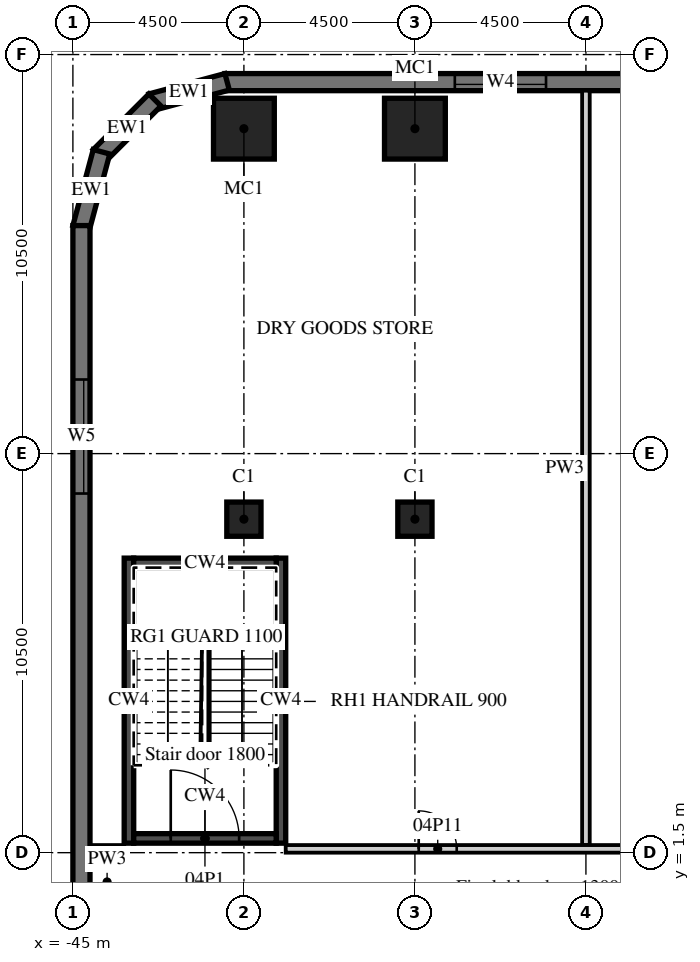
"""IFC4 building model, lengths in metres.
Left out: names, types, materials, properties, quantities, classifications, styles, units other than length and angle.
Written with IfcOpenShell. Run it as: python <this file> out.ifc"""

import sys

from ifc_helpers import new_model, si_unit, direction, frame, frame_2d, origin, origin_2d, place, context, subcontext, project, spatial, polyline, rectangle, outline, extrude, element, fill, save


model = new_model("IFC4")
c1 = context("Model", 3, precision=1e-05, world=origin(), true_north=direction((0.0, 1.0)))
c2 = subcontext(c1, "Body", "Model", "MODEL_VIEW")
j1 = project(units=[si_unit("LENGTHUNIT", "METRE"), si_unit("PLANEANGLEUNIT", "RADIAN")], contexts=[c1])
p1 = place(None, origin())
s1 = spatial("IfcSite", under=j1, at=p1, CompositionType="ELEMENT")
p2 = place(p1, origin())
s2 = spatial("IfcBuilding", under=s1, at=p2, CompositionType="ELEMENT")
p3 = place(p2, frame((0.0, 0.0, 29.0)))
s3 = spatial("IfcBuildingStorey", under=s2, at=p3, CompositionType="ELEMENT", Elevation=29.0)
for number, where, z_axis, x_axis in (
    (1, (-40.5, 20.55, 0.0), (0.0, 0.0, 1.0), (1.0, 0.0, 0.0)),
    (2, (-36.0, 20.55, 0.0), (0.0, 0.0, 1.0), (1.0, 0.0, 0.0)),
):
    element("IfcColumn", number, at=place(p3, frame(where, z_axis=z_axis, x_axis=x_axis)), inside=s3, PredefinedType="COLUMN", context=c2, shape_type="SweptSolid", body=[
        extrude(rectangle(XDim=1.6, YDim=1.6, at=origin_2d()), origin(), (0.0, 0.0, 1.0), 4.5),
    ])
for number, where, z_axis, x_axis in (
    (3, (-40.5, 10.275, 0.0), (0.0, 0.0, 1.0), (1.0, 0.0, 0.0)),
    (4, (-36.0, 10.275, 0.0), (0.0, 0.0, 1.0), (1.0, 0.0, 0.0)),
):
    element("IfcColumn", number, at=place(p3, frame(where, z_axis=z_axis, x_axis=x_axis)), inside=s3, PredefinedType="COLUMN", context=c2, shape_type="SweptSolid", body=[
        extrude(rectangle(XDim=0.9, YDim=0.9, at=origin_2d()), origin(), (0.0, 0.0, 1.0), 4.5),
    ])
p4 = place(p3, frame((13.5, 21.775, 0.0), z_axis=(0.0, 0.0, 1.0), x_axis=(-1.0, 0.0, 0.0)))
e5 = element("IfcWall", 5, at=p4, inside=s3, PredefinedType="SOLIDWALL", context=c2, shape_type="SweptSolid", body=[
    extrude(rectangle(XDim=54.5, YDim=0.45, at=frame_2d((27.25, 0.0))), origin(), (0.0, 0.0, 1.0), 4.05),
])
p5 = place(p4, frame((1.05, 0.0, 0.9)))
e6 = element("IfcOpeningElement", 6, at=p5, cuts=e5, PredefinedType="OPENING", context=c2, shape_type="SweptSolid", body=[
    extrude(rectangle(XDim=2.4, YDim=1.8, at=frame_2d((1.2, 0.9))), frame((0.0, 0.235, 0.0), z_axis=(0.0, -1.0, 0.0), x_axis=(1.0, 0.0, 0.0)), (0.0, 0.0, 1.0), 0.47),
])
p6 = place(p4, frame((5.55, 0.0, 0.9)))
e7 = element("IfcOpeningElement", 7, at=p6, cuts=e5, PredefinedType="OPENING", context=c2, shape_type="SweptSolid", body=[
    extrude(rectangle(XDim=2.4, YDim=1.8, at=frame_2d((1.2, 0.9))), frame((0.0, 0.235, 0.0), z_axis=(0.0, -1.0, 0.0), x_axis=(1.0, 0.0, 0.0)), (0.0, 0.0, 1.0), 0.47),
])
p7 = place(p4, frame((10.05, 0.0, 0.9)))
e8 = element("IfcOpeningElement", 8, at=p7, cuts=e5, PredefinedType="OPENING", context=c2, shape_type="SweptSolid", body=[
    extrude(rectangle(XDim=2.4, YDim=1.8, at=frame_2d((1.2, 0.9))), frame((0.0, 0.235, 0.0), z_axis=(0.0, -1.0, 0.0), x_axis=(1.0, 0.0, 0.0)), (0.0, 0.0, 1.0), 0.47),
])
p8 = place(p4, frame((14.55, 0.0, 0.9)))
e9 = element("IfcOpeningElement", 9, at=p8, cuts=e5, PredefinedType="OPENING", context=c2, shape_type="SweptSolid", body=[
    extrude(rectangle(XDim=2.4, YDim=1.8, at=frame_2d((1.2, 0.9))), frame((0.0, 0.235, 0.0), z_axis=(0.0, -1.0, 0.0), x_axis=(1.0, 0.0, 0.0)), (0.0, 0.0, 1.0), 0.47),
])
p9 = place(p4, frame((19.05, 0.0, 0.9)))
e10 = element("IfcOpeningElement", 10, at=p9, cuts=e5, PredefinedType="OPENING", context=c2, shape_type="SweptSolid", body=[
    extrude(rectangle(XDim=2.4, YDim=1.8, at=frame_2d((1.2, 0.9))), frame((0.0, 0.235, 0.0), z_axis=(0.0, -1.0, 0.0), x_axis=(1.0, 0.0, 0.0)), (0.0, 0.0, 1.0), 0.47),
])
p10 = place(p4, frame((23.55, 0.0, 0.9)))
e11 = element("IfcOpeningElement", 11, at=p10, cuts=e5, PredefinedType="OPENING", context=c2, shape_type="SweptSolid", body=[
    extrude(rectangle(XDim=2.4, YDim=1.8, at=frame_2d((1.2, 0.9))), frame((0.0, 0.235, 0.0), z_axis=(0.0, -1.0, 0.0), x_axis=(1.0, 0.0, 0.0)), (0.0, 0.0, 1.0), 0.47),
])
p11 = place(p4, frame((28.05, 0.0, 0.9)))
e12 = element("IfcOpeningElement", 12, at=p11, cuts=e5, PredefinedType="OPENING", context=c2, shape_type="SweptSolid", body=[
    extrude(rectangle(XDim=2.4, YDim=1.8, at=frame_2d((1.2, 0.9))), frame((0.0, 0.235, 0.0), z_axis=(0.0, -1.0, 0.0), x_axis=(1.0, 0.0, 0.0)), (0.0, 0.0, 1.0), 0.47),
])
p12 = place(p4, frame((32.55, 0.0, 0.9)))
e13 = element("IfcOpeningElement", 13, at=p12, cuts=e5, PredefinedType="OPENING", context=c2, shape_type="SweptSolid", body=[
    extrude(rectangle(XDim=2.4, YDim=1.8, at=frame_2d((1.2, 0.9))), frame((0.0, 0.235, 0.0), z_axis=(0.0, -1.0, 0.0), x_axis=(1.0, 0.0, 0.0)), (0.0, 0.0, 1.0), 0.47),
])
p13 = place(p4, frame((37.05, 0.0, 0.9)))
e14 = element("IfcOpeningElement", 14, at=p13, cuts=e5, PredefinedType="OPENING", context=c2, shape_type="SweptSolid", body=[
    extrude(rectangle(XDim=2.4, YDim=1.8, at=frame_2d((1.2, 0.9))), frame((0.0, 0.235, 0.0), z_axis=(0.0, -1.0, 0.0), x_axis=(1.0, 0.0, 0.0)), (0.0, 0.0, 1.0), 0.47),
])
p14 = place(p4, frame((41.55, 0.0, 0.9)))
e15 = element("IfcOpeningElement", 15, at=p14, cuts=e5, PredefinedType="OPENING", context=c2, shape_type="SweptSolid", body=[
    extrude(rectangle(XDim=2.4, YDim=1.8, at=frame_2d((1.2, 0.9))), frame((0.0, 0.235, 0.0), z_axis=(0.0, -1.0, 0.0), x_axis=(1.0, 0.0, 0.0)), (0.0, 0.0, 1.0), 0.47),
])
p15 = place(p4, frame((46.05, 0.0, 0.9)))
e16 = element("IfcOpeningElement", 16, at=p15, cuts=e5, PredefinedType="OPENING", context=c2, shape_type="SweptSolid", body=[
    extrude(rectangle(XDim=2.4, YDim=1.8, at=frame_2d((1.2, 0.9))), frame((0.0, 0.235, 0.0), z_axis=(0.0, -1.0, 0.0), x_axis=(1.0, 0.0, 0.0)), (0.0, 0.0, 1.0), 0.47),
])
p16 = place(p3, frame((-40.942, 21.783, 0.0), z_axis=(0.0, 0.0, 1.0), x_axis=(-0.965926999034, -0.25881466832, 0.0)))
e17 = element("IfcWall", 17, at=p16, inside=s3, PredefinedType="SOLIDWALL", context=c2, shape_type="SweptSolid", body=[
    extrude(outline(polyline([(0.0, -0.225), (2.071, -0.225), (1.95, 0.225), (0.121, 0.225), (0.0, -0.225)])), origin(), (0.0, 0.0, 1.0), 4.05),
])
p17 = place(p3, frame((-42.841, 21.305, 0.0), z_axis=(0.0, 0.0, 1.0), x_axis=(-0.707106781187, -0.707106781187, 0.0)))
e18 = element("IfcWall", 18, at=p17, inside=s3, PredefinedType="SOLIDWALL", context=c2, shape_type="SweptSolid", body=[
    extrude(outline(polyline([(0.0, -0.225), (2.071, -0.225), (1.95, 0.225), (0.121, 0.225), (0.0, -0.225)])), origin(), (0.0, 0.0, 1.0), 4.05),
])
p18 = place(p3, frame((-44.247, 19.942, 0.0), z_axis=(0.0, 0.0, 1.0), x_axis=(-0.25881466832, -0.965926999034, 0.0)))
e19 = element("IfcWall", 19, at=p18, inside=s3, PredefinedType="SOLIDWALL", context=c2, shape_type="SweptSolid", body=[
    extrude(outline(polyline([(-0.0, -0.225), (2.07, -0.225), (1.95, 0.225), (0.12, 0.225), (-0.0, -0.225)])), origin(), (0.0, 0.0, 1.0), 4.05),
])
p19 = place(p3, frame((-44.775, 18.0, 0.0), z_axis=(0.0, 0.0, 1.0), x_axis=(0.0, -1.0, 0.0)))
e20 = element("IfcWall", 20, at=p19, inside=s3, PredefinedType="SOLIDWALL", context=c2, shape_type="SweptSolid", body=[
    extrude(rectangle(XDim=36.0, YDim=0.45, at=frame_2d((18.0, 0.0))), origin(), (0.0, 0.0, 1.0), 4.05),
])
p20 = place(p19, frame((4.05, 0.0, 0.9)))
e21 = element("IfcOpeningElement", 21, at=p20, cuts=e20, PredefinedType="OPENING", context=c2, shape_type="SweptSolid", body=[
    extrude(rectangle(XDim=3.0, YDim=1.8, at=frame_2d((1.5, 0.9))), frame((0.0, 0.235, 0.0), z_axis=(0.0, -1.0, 0.0), x_axis=(1.0, 0.0, 0.0)), (0.0, 0.0, 1.0), 0.47),
])
for number, where, z_axis, x_axis in (
    (22, (-43.525, 1.75, 0.0), (0.0, 0.0, 1.0), (0.0, 1.0, 0.0)),
    (23, (-39.525, 1.75, 0.0), (0.0, 0.0, 1.0), (0.0, 1.0, 0.0)),
):
    element("IfcWall", number, at=place(p3, frame(where, z_axis=z_axis, x_axis=x_axis)), inside=s3, PredefinedType="SHEAR", context=c2, shape_type="SweptSolid", body=[
        extrude(rectangle(XDim=7.5, YDim=0.25, at=frame_2d((3.75, 0.0))), origin(), (0.0, 0.0, 1.0), 4.05),
    ])
p21 = place(p3, frame((-43.4, 9.125, 0.0), z_axis=(0.0, 0.0, 1.0), x_axis=(1.0, 0.0, 0.0)))
e24 = element("IfcWall", 24, at=p21, inside=s3, PredefinedType="SHEAR", context=c2, shape_type="SweptSolid", body=[
    extrude(rectangle(XDim=3.75, YDim=0.25, at=frame_2d((1.875, 0.0))), origin(), (0.0, 0.0, 1.0), 4.05),
])
p22 = place(p3, frame((-43.4, 1.875, 0.0), z_axis=(0.0, 0.0, 1.0), x_axis=(1.0, 0.0, 0.0)))
e25 = element("IfcWall", 25, at=p22, inside=s3, PredefinedType="SHEAR", context=c2, shape_type="SweptSolid", body=[
    extrude(rectangle(XDim=3.75, YDim=0.25, at=frame_2d((1.875, 0.0))), origin(), (0.0, 0.0, 1.0), 4.05),
])
p23 = place(p22, frame((0.975, 0.0, 0.0)))
e26 = element("IfcOpeningElement", 26, at=p23, cuts=e25, PredefinedType="OPENING", context=c2, shape_type="SweptSolid", body=[
    extrude(rectangle(XDim=1.8, YDim=2.1, at=frame_2d((0.9, 1.05))), frame((0.0, 0.135, 0.0), z_axis=(0.0, -1.0, 0.0), x_axis=(1.0, 0.0, 0.0)), (0.0, 0.0, 1.0), 0.27),
])
p24 = place(p3, frame((-31.5, 1.7, 0.0), z_axis=(0.0, 0.0, 1.0), x_axis=(0.0, 1.0, 0.0)))
e27 = element("IfcWall", 27, at=p24, inside=s3, PredefinedType="PARTITIONING", context=c2, shape_type="SweptSolid", body=[
    extrude(rectangle(XDim=19.85, YDim=0.2, at=frame_2d((9.925, 0.0))), origin(), (0.0, 0.0, 1.0), 4.05),
])
p25 = place(p3, frame((-39.4, 1.6, 0.0), z_axis=(0.0, 0.0, 1.0), x_axis=(1.0, 0.0, 0.0)))
e28 = element("IfcWall", 28, at=p25, inside=s3, PredefinedType="PARTITIONING", context=c2, shape_type="SweptSolid", body=[
    extrude(rectangle(XDim=52.7, YDim=0.2, at=frame_2d((26.35, 0.0))), origin(), (0.0, 0.0, 1.0), 4.05),
])
p26 = place(p25, frame((47.85, 0.0, 0.0)))
e29 = element("IfcOpeningElement", 29, at=p26, cuts=e28, PredefinedType="OPENING", context=c2, shape_type="SweptSolid", body=[
    extrude(rectangle(XDim=1.0, YDim=2.1, at=frame_2d((0.5, 1.05))), frame((0.0, 0.11, 0.0), z_axis=(0.0, -1.0, 0.0), x_axis=(1.0, 0.0, 0.0)), (0.0, 0.0, 1.0), 0.22),
])
p27 = place(p25, frame((37.96, 0.0, 0.0)))
e30 = element("IfcOpeningElement", 30, at=p27, cuts=e28, PredefinedType="OPENING", context=c2, shape_type="SweptSolid", body=[
    extrude(rectangle(XDim=1.0, YDim=2.1, at=frame_2d((0.5, 1.05))), frame((0.0, 0.11, 0.0), z_axis=(0.0, -1.0, 0.0), x_axis=(1.0, 0.0, 0.0)), (0.0, 0.0, 1.0), 0.22),
])
p28 = place(p25, frame((30.84, 0.0, 0.0)))
e31 = element("IfcOpeningElement", 31, at=p28, cuts=e28, PredefinedType="OPENING", context=c2, shape_type="SweptSolid", body=[
    extrude(rectangle(XDim=1.0, YDim=2.1, at=frame_2d((0.5, 1.05))), frame((0.0, 0.11, 0.0), z_axis=(0.0, -1.0, 0.0), x_axis=(1.0, 0.0, 0.0)), (0.0, 0.0, 1.0), 0.22),
])
p29 = place(p25, frame((23.375, 0.0, 0.0)))
e32 = element("IfcOpeningElement", 32, at=p29, cuts=e28, PredefinedType="OPENING", context=c2, shape_type="SweptSolid", body=[
    extrude(rectangle(XDim=1.2, YDim=2.1, at=frame_2d((0.6, 1.05))), frame((0.0, 0.11, 0.0), z_axis=(0.0, -1.0, 0.0), x_axis=(1.0, 0.0, 0.0)), (0.0, 0.0, 1.0), 0.22),
])
p30 = place(p25, frame((11.9, 0.0, 0.0)))
e33 = element("IfcOpeningElement", 33, at=p30, cuts=e28, PredefinedType="OPENING", context=c2, shape_type="SweptSolid", body=[
    extrude(rectangle(XDim=1.0, YDim=2.1, at=frame_2d((0.5, 1.05))), frame((0.0, 0.11, 0.0), z_axis=(0.0, -1.0, 0.0), x_axis=(1.0, 0.0, 0.0)), (0.0, 0.0, 1.0), 0.22),
])
p31 = place(p25, frame((3.5, 0.0, 0.0)))
e34 = element("IfcOpeningElement", 34, at=p31, cuts=e28, PredefinedType="OPENING", context=c2, shape_type="SweptSolid", body=[
    extrude(rectangle(XDim=1.0, YDim=2.1, at=frame_2d((0.5, 1.05))), frame((0.0, 0.11, 0.0), z_axis=(0.0, -1.0, 0.0), x_axis=(1.0, 0.0, 0.0)), (0.0, 0.0, 1.0), 0.22),
])
p32 = place(p3, frame((-44.55, 1.6, 0.0), z_axis=(0.0, 0.0, 1.0), x_axis=(1.0, 0.0, 0.0)))
e35 = element("IfcWall", 35, at=p32, inside=s3, PredefinedType="PARTITIONING", context=c2, shape_type="SweptSolid", body=[
    extrude(rectangle(XDim=0.9, YDim=0.2, at=frame_2d((0.45, 0.0))), origin(), (0.0, 0.0, 1.0), 4.05),
])
p33 = place(p15, origin())
e36 = element("IfcWindow", 36, at=p33, inside=s3, PartitioningType="SINGLE_PANEL", PredefinedType="WINDOW", context=c2, shape_type="SweptSolid", body=[
    extrude(rectangle(XDim=2.4, YDim=1.8, at=frame_2d((1.2, 0.9))), frame((0.0, 0.09, 0.0), z_axis=(0.0, -1.0, 0.0), x_axis=(1.0, 0.0, 0.0)), (0.0, 0.0, 1.0), 0.06),
])
fill(e16, e36)
p34 = place(p20, origin())
e37 = element("IfcWindow", 37, at=p34, inside=s3, PartitioningType="SINGLE_PANEL", PredefinedType="WINDOW", context=c2, shape_type="SweptSolid", body=[
    extrude(rectangle(XDim=3.0, YDim=1.8, at=frame_2d((1.5, 0.9))), frame((0.0, 0.09, 0.0), z_axis=(0.0, -1.0, 0.0), x_axis=(1.0, 0.0, 0.0)), (0.0, 0.0, 1.0), 0.06),
])
fill(e21, e37)
p35 = place(p23, origin())
e38 = element("IfcDoor", 38, at=p35, inside=s3, OperationType="DOUBLE_DOOR_DOUBLE_SWING", PredefinedType="DOOR", context=c2, shape_type="SweptSolid", body=[
    extrude(rectangle(XDim=1.8, YDim=2.1, at=frame_2d((0.9, 1.05))), frame((0.0, 0.025, 0.0), z_axis=(0.0, -1.0, 0.0), x_axis=(1.0, 0.0, 0.0)), (0.0, 0.0, 1.0), 0.05),
])
fill(e26, e38)
p36 = place(p31, origin())
e39 = element("IfcDoor", 39, at=p36, inside=s3, OperationType="SINGLE_SWING_LEFT", PredefinedType="DOOR", context=c2, shape_type="SweptSolid", body=[
    extrude(rectangle(XDim=1.0, YDim=2.1, at=frame_2d((0.5, 1.05))), frame((0.0, 0.025, 0.0), z_axis=(0.0, -1.0, 0.0), x_axis=(1.0, 0.0, 0.0)), (0.0, 0.0, 1.0), 0.05),
])
fill(e34, e39)
save(model, sys.argv[1])
